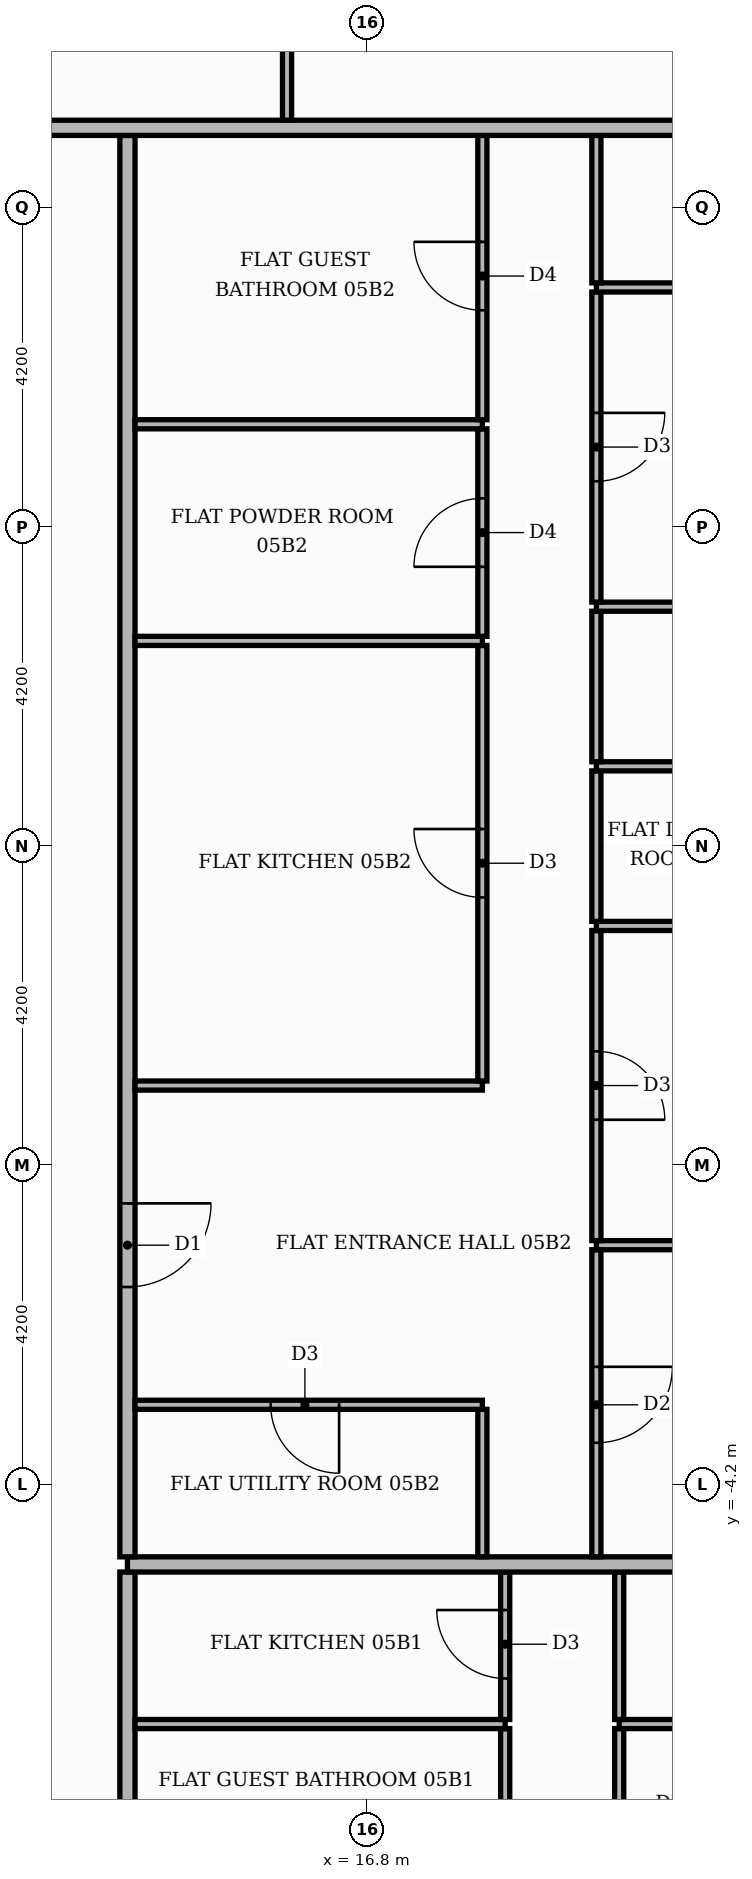
"""IFC4 building model, lengths in metres.
Left out: names, types, materials, properties, quantities, classifications, styles, units other than length and angle.
Written with IfcOpenShell. Run it as: python <this file> out.ifc"""

import sys

from ifc_helpers import new_model, si_unit, direction, frame, frame_2d, origin, place, context, subcontext, project, spatial, rectangle, extrude, element, fill, save


model = new_model("IFC4")
c1 = context("Model", 3, precision=1e-05, world=origin(), true_north=direction((0.0, 1.0)))
c2 = subcontext(c1, "Body", "Model", "MODEL_VIEW")
j1 = project(units=[si_unit("LENGTHUNIT", "METRE"), si_unit("PLANEANGLEUNIT", "RADIAN")], contexts=[c1])
p1 = place(None, origin())
s1 = spatial("IfcSite", under=j1, at=p1, CompositionType="ELEMENT")
p2 = place(p1, origin())
s2 = spatial("IfcBuilding", under=s1, at=p2, CompositionType="ELEMENT")
p3 = place(p2, frame((0.0, 0.0, 27.0)))
s3 = spatial("IfcBuildingStorey", under=s2, at=p3, CompositionType="ELEMENT", Elevation=27.0)
p4 = place(p3, frame((13.65, -13.55, 0.0), z_axis=(0.0, 0.0, 1.0), x_axis=(0.0, 1.0, 0.0)))
e1 = element("IfcWall", 1, at=p4, inside=s3, PredefinedType="PARTITIONING", context=c2, shape_type="SweptSolid", body=[
    extrude(rectangle(XDim=8.2, YDim=0.2, at=frame_2d((4.1, 0.0))), origin(), (0.0, 0.0, 1.0), 3.48),
])
p5 = place(p4, frame((1.45, 0.0, 0.0)))
e2 = element("IfcOpeningElement", 2, at=p5, cuts=e1, PredefinedType="OPENING", context=c2, shape_type="SweptSolid", body=[
    extrude(rectangle(XDim=1.1, YDim=2.4, at=frame_2d((0.55, 1.2))), frame((0.0, 0.11, 0.0), z_axis=(0.0, -1.0, 0.0), x_axis=(1.0, 0.0, 0.0)), (0.0, 0.0, 1.0), 0.22),
])
for number, where, z_axis, x_axis in (
    (3, (18.62, -9.39, 0.0), (0.0, 0.0, 1.0), (0.0, 1.0, 0.0)),
    (4, (20.12, -9.39, 0.0), (0.0, 0.0, 1.0), (0.0, 1.0, 0.0)),
):
    element("IfcWall", number, at=place(p3, frame(where, z_axis=z_axis, x_axis=x_axis)), inside=s3, PredefinedType="PARTITIONING", context=c2, shape_type="SweptSolid", body=[
        extrude(rectangle(XDim=1.98, YDim=0.12, at=frame_2d((0.99, 0.0))), origin(), (0.0, 0.0, 1.0), 3.48),
    ])
p6 = place(p3, frame((13.75, -7.35, 0.0), z_axis=(0.0, 0.0, 1.0), x_axis=(1.0, 0.0, 0.0)))
e5 = element("IfcWall", 5, at=p6, inside=s3, PredefinedType="PARTITIONING", context=c2, shape_type="SweptSolid", body=[
    extrude(rectangle(XDim=4.87, YDim=0.12, at=frame_2d((2.435, 0.0))), origin(), (0.0, 0.0, 1.0), 3.48),
])
p7 = place(p3, frame((20.12, -7.35, 0.0), z_axis=(0.0, 0.0, 1.0), x_axis=(1.0, 0.0, 0.0)))
e6 = element("IfcWall", 6, at=p7, inside=s3, PredefinedType="PARTITIONING", context=c2, shape_type="SweptSolid", body=[
    extrude(rectangle(XDim=5.3, YDim=0.12, at=frame_2d((2.65, 0.0))), origin(), (0.0, 0.0, 1.0), 3.48),
])
p8 = place(p7, frame((2.35, 0.0, 0.0)))
e7 = element("IfcOpeningElement", 7, at=p8, cuts=e6, PredefinedType="OPENING", context=c2, shape_type="SweptSolid", body=[
    extrude(rectangle(XDim=0.9, YDim=2.1, at=frame_2d((0.45, 1.05))), frame((0.0, 0.07, 0.0), z_axis=(0.0, -1.0, 0.0), x_axis=(1.0, 0.0, 0.0)), (0.0, 0.0, 1.0), 0.14),
])
p9 = place(p3, frame((18.62, -7.29, 0.0), z_axis=(0.0, 0.0, 1.0), x_axis=(0.0, 1.0, 0.0)))
e8 = element("IfcWall", 8, at=p9, inside=s3, PredefinedType="PARTITIONING", context=c2, shape_type="SweptSolid", body=[
    extrude(rectangle(XDim=1.94, YDim=0.12, at=frame_2d((0.97, 0.0))), origin(), (0.0, 0.0, 1.0), 3.48),
])
p10 = place(p9, frame((0.54, 0.0, 0.0)))
e9 = element("IfcOpeningElement", 9, at=p10, cuts=e8, PredefinedType="OPENING", context=c2, shape_type="SweptSolid", body=[
    extrude(rectangle(XDim=0.9, YDim=2.1, at=frame_2d((0.45, 1.05))), frame((0.0, 0.07, 0.0), z_axis=(0.0, -1.0, 0.0), x_axis=(1.0, 0.0, 0.0)), (0.0, 0.0, 1.0), 0.14),
])
p11 = place(p3, frame((20.12, -7.29, 0.0), z_axis=(0.0, 0.0, 1.0), x_axis=(0.0, 1.0, 0.0)))
e10 = element("IfcWall", 10, at=p11, inside=s3, PredefinedType="PARTITIONING", context=c2, shape_type="SweptSolid", body=[
    extrude(rectangle(XDim=1.94, YDim=0.12, at=frame_2d((0.97, 0.0))), origin(), (0.0, 0.0, 1.0), 3.48),
])
p12 = place(p3, frame((13.65, -5.25, 0.0), z_axis=(0.0, 0.0, 1.0), x_axis=(1.0, 0.0, 0.0)))
e11 = element("IfcWall", 11, at=p12, inside=s3, PredefinedType="PARTITIONING", context=c2, shape_type="SweptSolid", body=[
    extrude(rectangle(XDim=11.77, YDim=0.2, at=frame_2d((5.885, 0.0))), origin(), (0.0, 0.0, 1.0), 3.48),
])
p13 = place(p3, frame((13.65, -5.15, 0.0), z_axis=(0.0, 0.0, 1.0), x_axis=(0.0, 1.0, 0.0)))
e12 = element("IfcWall", 12, at=p13, inside=s3, PredefinedType="PARTITIONING", context=c2, shape_type="SweptSolid", body=[
    extrude(rectangle(XDim=18.7, YDim=0.2, at=frame_2d((9.35, 0.0))), origin(), (0.0, 0.0, 1.0), 3.48),
])
p14 = place(p13, frame((3.55, 0.0, 0.0)))
e13 = element("IfcOpeningElement", 13, at=p14, cuts=e12, PredefinedType="OPENING", context=c2, shape_type="SweptSolid", body=[
    extrude(rectangle(XDim=1.1, YDim=2.4, at=frame_2d((0.55, 1.2))), frame((0.0, 0.11, 0.0), z_axis=(0.0, -1.0, 0.0), x_axis=(1.0, 0.0, 0.0)), (0.0, 0.0, 1.0), 0.22),
])
p15 = place(p3, frame((18.32, -5.15, 0.0), z_axis=(0.0, 0.0, 1.0), x_axis=(0.0, 1.0, 0.0)))
e14 = element("IfcWall", 14, at=p15, inside=s3, PredefinedType="PARTITIONING", context=c2, shape_type="SweptSolid", body=[
    extrude(rectangle(XDim=1.94, YDim=0.12, at=frame_2d((0.97, 0.0))), origin(), (0.0, 0.0, 1.0), 3.48),
])
p16 = place(p3, frame((19.82, -5.15, 0.0), z_axis=(0.0, 0.0, 1.0), x_axis=(0.0, 1.0, 0.0)))
e15 = element("IfcWall", 15, at=p16, inside=s3, PredefinedType="PARTITIONING", context=c2, shape_type="SweptSolid", body=[
    extrude(rectangle(XDim=4.04, YDim=0.12, at=frame_2d((2.02, 0.0))), origin(), (0.0, 0.0, 1.0), 3.48),
])
p17 = place(p16, frame((1.5, 0.0, 0.0)))
e16 = element("IfcOpeningElement", 16, at=p17, cuts=e15, PredefinedType="OPENING", context=c2, shape_type="SweptSolid", body=[
    extrude(rectangle(XDim=1.0, YDim=2.1, at=frame_2d((0.5, 1.05))), frame((0.0, 0.07, 0.0), z_axis=(0.0, -1.0, 0.0), x_axis=(1.0, 0.0, 0.0)), (0.0, 0.0, 1.0), 0.14),
])
p18 = place(p3, frame((13.75, -3.15, 0.0), z_axis=(0.0, 0.0, 1.0), x_axis=(1.0, 0.0, 0.0)))
e17 = element("IfcWall", 17, at=p18, inside=s3, PredefinedType="PARTITIONING", context=c2, shape_type="SweptSolid", body=[
    extrude(rectangle(XDim=4.57, YDim=0.12, at=frame_2d((2.285, 0.0))), origin(), (0.0, 0.0, 1.0), 3.48),
])
p19 = place(p18, frame((1.785, 0.0, 0.0)))
e18 = element("IfcOpeningElement", 18, at=p19, cuts=e17, PredefinedType="OPENING", context=c2, shape_type="SweptSolid", body=[
    extrude(rectangle(XDim=0.9, YDim=2.1, at=frame_2d((0.45, 1.05))), frame((0.0, 0.07, 0.0), z_axis=(0.0, -1.0, 0.0), x_axis=(1.0, 0.0, 0.0)), (0.0, 0.0, 1.0), 0.14),
])
p20 = place(p3, frame((19.82, -1.05, 0.0), z_axis=(0.0, 0.0, 1.0), x_axis=(1.0, 0.0, 0.0)))
e19 = element("IfcWall", 19, at=p20, inside=s3, PredefinedType="PARTITIONING", context=c2, shape_type="SweptSolid", body=[
    extrude(rectangle(XDim=5.6, YDim=0.12, at=frame_2d((2.8, 0.0))), origin(), (0.0, 0.0, 1.0), 3.48),
])
p21 = place(p3, frame((19.82, -0.99, 0.0), z_axis=(0.0, 0.0, 1.0), x_axis=(0.0, 1.0, 0.0)))
e20 = element("IfcWall", 20, at=p21, inside=s3, PredefinedType="PARTITIONING", context=c2, shape_type="SweptSolid", body=[
    extrude(rectangle(XDim=4.08, YDim=0.12, at=frame_2d((2.04, 0.0))), origin(), (0.0, 0.0, 1.0), 3.48),
])
p22 = place(p21, frame((1.59, 0.0, 0.0)))
e21 = element("IfcOpeningElement", 21, at=p22, cuts=e20, PredefinedType="OPENING", context=c2, shape_type="SweptSolid", body=[
    extrude(rectangle(XDim=0.9, YDim=2.1, at=frame_2d((0.45, 1.05))), frame((0.0, 0.07, 0.0), z_axis=(0.0, -1.0, 0.0), x_axis=(1.0, 0.0, 0.0)), (0.0, 0.0, 1.0), 0.14),
])
p23 = place(p3, frame((13.75, 1.05, 0.0), z_axis=(0.0, 0.0, 1.0), x_axis=(1.0, 0.0, 0.0)))
e22 = element("IfcWall", 22, at=p23, inside=s3, PredefinedType="PARTITIONING", context=c2, shape_type="SweptSolid", body=[
    extrude(rectangle(XDim=4.57, YDim=0.12, at=frame_2d((2.285, 0.0))), origin(), (0.0, 0.0, 1.0), 3.48),
])
p24 = place(p3, frame((18.32, 1.11, 0.0), z_axis=(0.0, 0.0, 1.0), x_axis=(0.0, 1.0, 0.0)))
e23 = element("IfcWall", 23, at=p24, inside=s3, PredefinedType="PARTITIONING", context=c2, shape_type="SweptSolid", body=[
    extrude(rectangle(XDim=5.73, YDim=0.12, at=frame_2d((2.865, 0.0))), origin(), (0.0, 0.0, 1.0), 3.48),
])
p25 = place(p24, frame((2.415, 0.0, 0.0)))
e24 = element("IfcOpeningElement", 24, at=p25, cuts=e23, PredefinedType="OPENING", context=c2, shape_type="SweptSolid", body=[
    extrude(rectangle(XDim=0.9, YDim=2.1, at=frame_2d((0.45, 1.05))), frame((0.0, 0.07, 0.0), z_axis=(0.0, -1.0, 0.0), x_axis=(1.0, 0.0, 0.0)), (0.0, 0.0, 1.0), 0.14),
])
p26 = place(p3, frame((19.82, 3.15, 0.0), z_axis=(0.0, 0.0, 1.0), x_axis=(1.0, 0.0, 0.0)))
e25 = element("IfcWall", 25, at=p26, inside=s3, PredefinedType="PARTITIONING", context=c2, shape_type="SweptSolid", body=[
    extrude(rectangle(XDim=5.6, YDim=0.12, at=frame_2d((2.8, 0.0))), origin(), (0.0, 0.0, 1.0), 3.48),
])
p27 = place(p26, frame((2.5, 0.0, 0.0)))
e26 = element("IfcOpeningElement", 26, at=p27, cuts=e25, PredefinedType="OPENING", context=c2, shape_type="SweptSolid", body=[
    extrude(rectangle(XDim=0.9, YDim=2.1, at=frame_2d((0.45, 1.05))), frame((0.0, 0.07, 0.0), z_axis=(0.0, -1.0, 0.0), x_axis=(1.0, 0.0, 0.0)), (0.0, 0.0, 1.0), 0.14),
])
p28 = place(p3, frame((19.82, 3.21, 0.0), z_axis=(0.0, 0.0, 1.0), x_axis=(0.0, 1.0, 0.0)))
e27 = element("IfcWall", 27, at=p28, inside=s3, PredefinedType="PARTITIONING", context=c2, shape_type="SweptSolid", body=[
    extrude(rectangle(XDim=1.98, YDim=0.12, at=frame_2d((0.99, 0.0))), origin(), (0.0, 0.0, 1.0), 3.48),
])
p29 = place(p3, frame((19.82, 5.25, 0.0), z_axis=(0.0, 0.0, 1.0), x_axis=(1.0, 0.0, 0.0)))
e28 = element("IfcWall", 28, at=p29, inside=s3, PredefinedType="PARTITIONING", context=c2, shape_type="SweptSolid", body=[
    extrude(rectangle(XDim=5.6, YDim=0.12, at=frame_2d((2.8, 0.0))), origin(), (0.0, 0.0, 1.0), 3.48),
])
p30 = place(p29, frame((2.5, 0.0, 0.0)))
e29 = element("IfcOpeningElement", 29, at=p30, cuts=e28, PredefinedType="OPENING", context=c2, shape_type="SweptSolid", body=[
    extrude(rectangle(XDim=0.9, YDim=2.1, at=frame_2d((0.45, 1.05))), frame((0.0, 0.07, 0.0), z_axis=(0.0, -1.0, 0.0), x_axis=(1.0, 0.0, 0.0)), (0.0, 0.0, 1.0), 0.14),
])
p31 = place(p3, frame((19.82, 5.31, 0.0), z_axis=(0.0, 0.0, 1.0), x_axis=(0.0, 1.0, 0.0)))
e30 = element("IfcWall", 30, at=p31, inside=s3, PredefinedType="PARTITIONING", context=c2, shape_type="SweptSolid", body=[
    extrude(rectangle(XDim=1.98, YDim=0.12, at=frame_2d((0.99, 0.0))), origin(), (0.0, 0.0, 1.0), 3.48),
])
p32 = place(p3, frame((13.75, 6.9, 0.0), z_axis=(0.0, 0.0, 1.0), x_axis=(1.0, 0.0, 0.0)))
e31 = element("IfcWall", 31, at=p32, inside=s3, PredefinedType="PARTITIONING", context=c2, shape_type="SweptSolid", body=[
    extrude(rectangle(XDim=4.57, YDim=0.12, at=frame_2d((2.285, 0.0))), origin(), (0.0, 0.0, 1.0), 3.48),
])
p33 = place(p3, frame((18.32, 6.96, 0.0), z_axis=(0.0, 0.0, 1.0), x_axis=(0.0, 1.0, 0.0)))
e32 = element("IfcWall", 32, at=p33, inside=s3, PredefinedType="PARTITIONING", context=c2, shape_type="SweptSolid", body=[
    extrude(rectangle(XDim=2.73, YDim=0.12, at=frame_2d((1.365, 0.0))), origin(), (0.0, 0.0, 1.0), 3.48),
])
p34 = place(p33, frame((0.915, 0.0, 0.0)))
e33 = element("IfcOpeningElement", 33, at=p34, cuts=e32, PredefinedType="OPENING", context=c2, shape_type="SweptSolid", body=[
    extrude(rectangle(XDim=0.9, YDim=2.1, at=frame_2d((0.45, 1.05))), frame((0.0, 0.07, 0.0), z_axis=(0.0, -1.0, 0.0), x_axis=(1.0, 0.0, 0.0)), (0.0, 0.0, 1.0), 0.14),
])
p35 = place(p3, frame((19.82, 7.35, 0.0), z_axis=(0.0, 0.0, 1.0), x_axis=(1.0, 0.0, 0.0)))
e34 = element("IfcWall", 34, at=p35, inside=s3, PredefinedType="PARTITIONING", context=c2, shape_type="SweptSolid", body=[
    extrude(rectangle(XDim=5.6, YDim=0.12, at=frame_2d((2.8, 0.0))), origin(), (0.0, 0.0, 1.0), 3.48),
])
p36 = place(p3, frame((19.82, 7.41, 0.0), z_axis=(0.0, 0.0, 1.0), x_axis=(0.0, 1.0, 0.0)))
e35 = element("IfcWall", 35, at=p36, inside=s3, PredefinedType="PARTITIONING", context=c2, shape_type="SweptSolid", body=[
    extrude(rectangle(XDim=4.08, YDim=0.12, at=frame_2d((2.04, 0.0))), origin(), (0.0, 0.0, 1.0), 3.48),
])
p37 = place(p36, frame((1.59, 0.0, 0.0)))
e36 = element("IfcOpeningElement", 36, at=p37, cuts=e35, PredefinedType="OPENING", context=c2, shape_type="SweptSolid", body=[
    extrude(rectangle(XDim=0.9, YDim=2.1, at=frame_2d((0.45, 1.05))), frame((0.0, 0.07, 0.0), z_axis=(0.0, -1.0, 0.0), x_axis=(1.0, 0.0, 0.0)), (0.0, 0.0, 1.0), 0.14),
])
p38 = place(p3, frame((13.75, 9.75, 0.0), z_axis=(0.0, 0.0, 1.0), x_axis=(1.0, 0.0, 0.0)))
e37 = element("IfcWall", 37, at=p38, inside=s3, PredefinedType="PARTITIONING", context=c2, shape_type="SweptSolid", body=[
    extrude(rectangle(XDim=4.57, YDim=0.12, at=frame_2d((2.285, 0.0))), origin(), (0.0, 0.0, 1.0), 3.48),
])
p39 = place(p3, frame((18.32, 9.81, 0.0), z_axis=(0.0, 0.0, 1.0), x_axis=(0.0, 1.0, 0.0)))
e38 = element("IfcWall", 38, at=p39, inside=s3, PredefinedType="PARTITIONING", context=c2, shape_type="SweptSolid", body=[
    extrude(rectangle(XDim=3.74, YDim=0.12, at=frame_2d((1.87, 0.0))), origin(), (0.0, 0.0, 1.0), 3.48),
])
p40 = place(p39, frame((1.44, 0.0, 0.0)))
e39 = element("IfcOpeningElement", 39, at=p40, cuts=e38, PredefinedType="OPENING", context=c2, shape_type="SweptSolid", body=[
    extrude(rectangle(XDim=0.9, YDim=2.1, at=frame_2d((0.45, 1.05))), frame((0.0, 0.07, 0.0), z_axis=(0.0, -1.0, 0.0), x_axis=(1.0, 0.0, 0.0)), (0.0, 0.0, 1.0), 0.14),
])
p41 = place(p3, frame((19.82, 11.55, 0.0), z_axis=(0.0, 0.0, 1.0), x_axis=(1.0, 0.0, 0.0)))
e40 = element("IfcWall", 40, at=p41, inside=s3, PredefinedType="PARTITIONING", context=c2, shape_type="SweptSolid", body=[
    extrude(rectangle(XDim=5.6, YDim=0.12, at=frame_2d((2.8, 0.0))), origin(), (0.0, 0.0, 1.0), 3.48),
])
p42 = place(p41, frame((2.5, 0.0, 0.0)))
e41 = element("IfcOpeningElement", 41, at=p42, cuts=e40, PredefinedType="OPENING", context=c2, shape_type="SweptSolid", body=[
    extrude(rectangle(XDim=0.9, YDim=2.1, at=frame_2d((0.45, 1.05))), frame((0.0, 0.07, 0.0), z_axis=(0.0, -1.0, 0.0), x_axis=(1.0, 0.0, 0.0)), (0.0, 0.0, 1.0), 0.14),
])
p43 = place(p3, frame((19.82, 11.61, 0.0), z_axis=(0.0, 0.0, 1.0), x_axis=(0.0, 1.0, 0.0)))
e42 = element("IfcWall", 42, at=p43, inside=s3, PredefinedType="PARTITIONING", context=c2, shape_type="SweptSolid", body=[
    extrude(rectangle(XDim=1.94, YDim=0.12, at=frame_2d((0.97, 0.0))), origin(), (0.0, 0.0, 1.0), 3.48),
])
p44 = place(p3, frame((-13.65, 13.65, 0.0), z_axis=(0.0, 0.0, 1.0), x_axis=(1.0, 0.0, 0.0)))
e43 = element("IfcWall", 43, at=p44, inside=s3, PredefinedType="PARTITIONING", context=c2, shape_type="SweptSolid", body=[
    extrude(rectangle(XDim=39.07, YDim=0.2, at=frame_2d((19.535, 0.0))), origin(), (0.0, 0.0, 1.0), 3.48),
])
p45 = place(p44, frame((24.65, 0.0, 0.0)))
e44 = element("IfcOpeningElement", 44, at=p45, cuts=e43, PredefinedType="OPENING", context=c2, shape_type="SweptSolid", body=[
    extrude(rectangle(XDim=1.1, YDim=2.4, at=frame_2d((0.55, 1.2))), frame((0.0, 0.11, 0.0), z_axis=(0.0, -1.0, 0.0), x_axis=(1.0, 0.0, 0.0)), (0.0, 0.0, 1.0), 0.22),
])
p46 = place(p44, frame((14.15, 0.0, 0.0)))
e45 = element("IfcOpeningElement", 45, at=p46, cuts=e43, PredefinedType="OPENING", context=c2, shape_type="SweptSolid", body=[
    extrude(rectangle(XDim=1.1, YDim=2.4, at=frame_2d((0.55, 1.2))), frame((0.0, 0.11, 0.0), z_axis=(0.0, -1.0, 0.0), x_axis=(1.0, 0.0, 0.0)), (0.0, 0.0, 1.0), 0.22),
])
p47 = place(p3, frame((15.75, 13.75, 0.0), z_axis=(0.0, 0.0, 1.0), x_axis=(0.0, 1.0, 0.0)))
e46 = element("IfcWall", 46, at=p47, inside=s3, PredefinedType="PARTITIONING", context=c2, shape_type="SweptSolid", body=[
    extrude(rectangle(XDim=6.01, YDim=0.12, at=frame_2d((3.005, 0.0))), origin(), (0.0, 0.0, 1.0), 3.48),
])
p48 = place(p47, frame((2.485, 0.0, 0.0)))
e47 = element("IfcOpeningElement", 47, at=p48, cuts=e46, PredefinedType="OPENING", context=c2, shape_type="SweptSolid", body=[
    extrude(rectangle(XDim=1.0, YDim=2.1, at=frame_2d((0.5, 1.05))), frame((0.0, 0.07, 0.0), z_axis=(0.0, -1.0, 0.0), x_axis=(1.0, 0.0, 0.0)), (0.0, 0.0, 1.0), 0.14),
])
p49 = place(p10, origin())
e48 = element("IfcDoor", 48, at=p49, inside=s3, OperationType="SINGLE_SWING_RIGHT", PredefinedType="DOOR", context=c2, shape_type="SweptSolid", body=[
    extrude(rectangle(XDim=0.9, YDim=2.1, at=frame_2d((0.45, 1.05))), frame((0.0, 0.025, 0.0), z_axis=(0.0, -1.0, 0.0), x_axis=(1.0, 0.0, 0.0)), (0.0, 0.0, 1.0), 0.05),
])
fill(e9, e48)
p50 = place(p14, frame((1.1, 0.0, 0.0), z_axis=(0.0, 0.0, 1.0), x_axis=(-1.0, 0.0, 0.0)))
e49 = element("IfcDoor", 49, at=p50, inside=s3, OperationType="SINGLE_SWING_RIGHT", PredefinedType="DOOR", context=c2, shape_type="SweptSolid", body=[
    extrude(rectangle(XDim=1.1, YDim=2.4, at=frame_2d((0.55, 1.2))), frame((0.0, 0.025, 0.0), z_axis=(0.0, -1.0, 0.0), x_axis=(1.0, 0.0, 0.0)), (0.0, 0.0, 1.0), 0.05),
])
fill(e13, e49)
p51 = place(p19, frame((0.9, 0.0, 0.0), z_axis=(0.0, 0.0, 1.0), x_axis=(-1.0, 0.0, 0.0)))
e50 = element("IfcDoor", 50, at=p51, inside=s3, OperationType="SINGLE_SWING_RIGHT", PredefinedType="DOOR", context=c2, shape_type="SweptSolid", body=[
    extrude(rectangle(XDim=0.9, YDim=2.1, at=frame_2d((0.45, 1.05))), frame((0.0, 0.025, 0.0), z_axis=(0.0, -1.0, 0.0), x_axis=(1.0, 0.0, 0.0)), (0.0, 0.0, 1.0), 0.05),
])
fill(e18, e50)
p52 = place(p25, origin())
e51 = element("IfcDoor", 51, at=p52, inside=s3, OperationType="SINGLE_SWING_RIGHT", PredefinedType="DOOR", context=c2, shape_type="SweptSolid", body=[
    extrude(rectangle(XDim=0.9, YDim=2.1, at=frame_2d((0.45, 1.05))), frame((0.0, 0.025, 0.0), z_axis=(0.0, -1.0, 0.0), x_axis=(1.0, 0.0, 0.0)), (0.0, 0.0, 1.0), 0.05),
])
fill(e24, e51)
p53 = place(p34, origin())
e52 = element("IfcDoor", 52, at=p53, inside=s3, OperationType="SINGLE_SWING_LEFT", PredefinedType="DOOR", context=c2, shape_type="SweptSolid", body=[
    extrude(rectangle(XDim=0.9, YDim=2.1, at=frame_2d((0.45, 1.05))), frame((0.0, 0.025, 0.0), z_axis=(0.0, -1.0, 0.0), x_axis=(1.0, 0.0, 0.0)), (0.0, 0.0, 1.0), 0.05),
])
fill(e33, e52)
p54 = place(p40, origin())
e53 = element("IfcDoor", 53, at=p54, inside=s3, OperationType="SINGLE_SWING_RIGHT", PredefinedType="DOOR", context=c2, shape_type="SweptSolid", body=[
    extrude(rectangle(XDim=0.9, YDim=2.1, at=frame_2d((0.45, 1.05))), frame((0.0, 0.025, 0.0), z_axis=(0.0, -1.0, 0.0), x_axis=(1.0, 0.0, 0.0)), (0.0, 0.0, 1.0), 0.05),
])
fill(e39, e53)
p55 = place(p17, frame((1.0, 0.0, 0.0), z_axis=(0.0, 0.0, 1.0), x_axis=(-1.0, 0.0, 0.0)))
e54 = element("IfcDoor", 54, at=p55, inside=s3, OperationType="SINGLE_SWING_RIGHT", PredefinedType="DOOR", context=c2, shape_type="SweptSolid", body=[
    extrude(rectangle(XDim=1.0, YDim=2.1, at=frame_2d((0.5, 1.05))), frame((0.0, 0.025, 0.0), z_axis=(0.0, -1.0, 0.0), x_axis=(1.0, 0.0, 0.0)), (0.0, 0.0, 1.0), 0.05),
])
fill(e16, e54)
p56 = place(p22, frame((0.9, 0.0, 0.0), z_axis=(0.0, 0.0, 1.0), x_axis=(-1.0, 0.0, 0.0)))
e55 = element("IfcDoor", 55, at=p56, inside=s3, OperationType="SINGLE_SWING_LEFT", PredefinedType="DOOR", context=c2, shape_type="SweptSolid", body=[
    extrude(rectangle(XDim=0.9, YDim=2.1, at=frame_2d((0.45, 1.05))), frame((0.0, 0.025, 0.0), z_axis=(0.0, -1.0, 0.0), x_axis=(1.0, 0.0, 0.0)), (0.0, 0.0, 1.0), 0.05),
])
fill(e21, e55)
p57 = place(p37, frame((0.9, 0.0, 0.0), z_axis=(0.0, 0.0, 1.0), x_axis=(-1.0, 0.0, 0.0)))
e56 = element("IfcDoor", 56, at=p57, inside=s3, OperationType="SINGLE_SWING_RIGHT", PredefinedType="DOOR", context=c2, shape_type="SweptSolid", body=[
    extrude(rectangle(XDim=0.9, YDim=2.1, at=frame_2d((0.45, 1.05))), frame((0.0, 0.025, 0.0), z_axis=(0.0, -1.0, 0.0), x_axis=(1.0, 0.0, 0.0)), (0.0, 0.0, 1.0), 0.05),
])
fill(e36, e56)
save(model, sys.argv[1])
